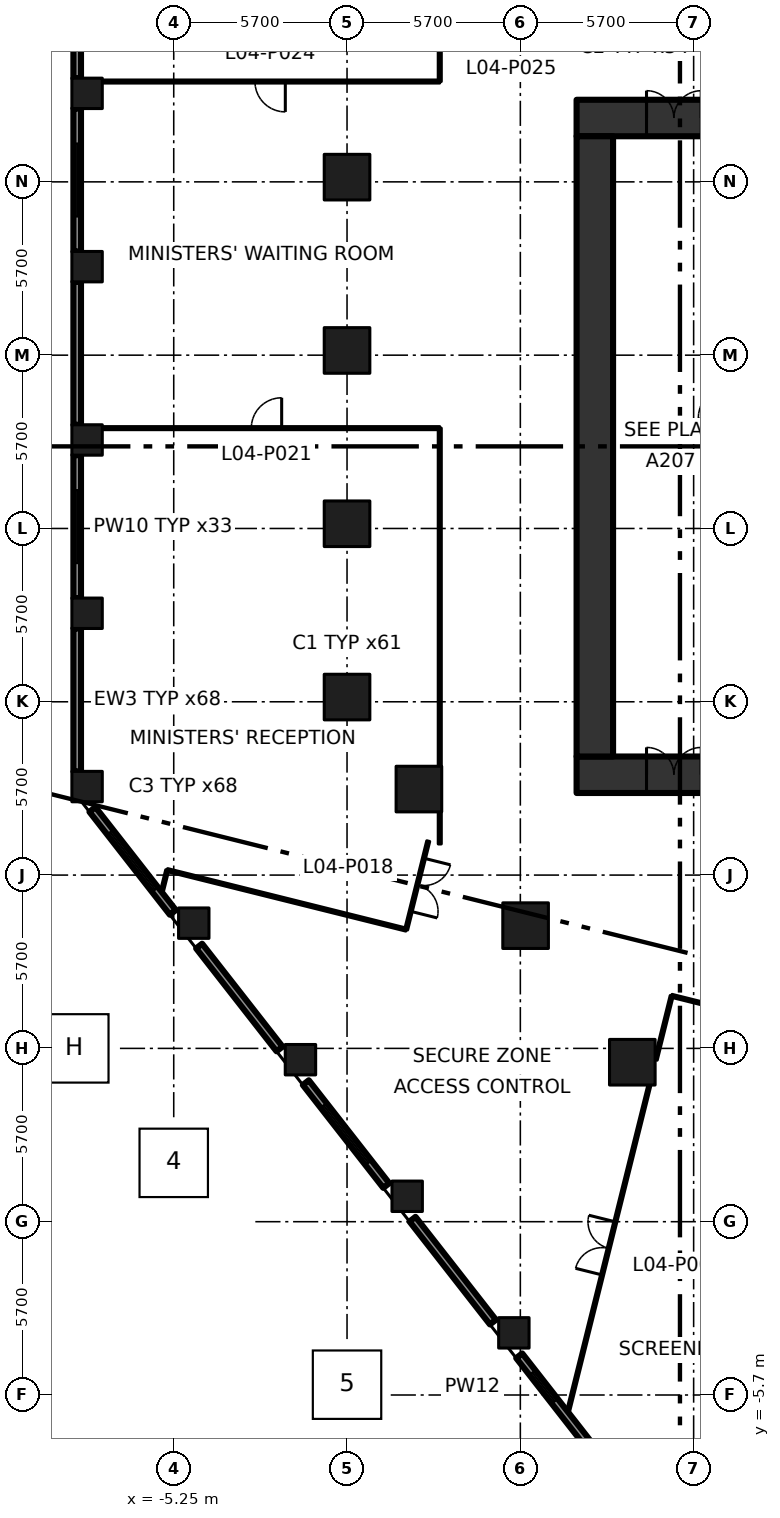
"""IFC4 building model, lengths in metres.
Left out: names, types, materials, properties, quantities, classifications, styles, units other than length and angle.
Written with IfcOpenShell. Run it as: python <this file> out.ifc"""

import sys

from ifc_helpers import new_model, si_unit, direction, frame, frame_2d, origin, origin_2d, place, context, subcontext, project, spatial, rectangle, extrude, element, fill, save


model = new_model("IFC4")
c1 = context("Model", 3, precision=1e-05, world=origin(), true_north=direction((0.0, 1.0)))
c2 = subcontext(c1, "Body", "Model", "MODEL_VIEW")
j1 = project(units=[si_unit("LENGTHUNIT", "METRE"), si_unit("PLANEANGLEUNIT", "RADIAN")], contexts=[c1])
p1 = place(None, origin())
s1 = spatial("IfcSite", under=j1, at=p1, CompositionType="ELEMENT")
p2 = place(p1, origin())
s2 = spatial("IfcBuilding", under=s1, at=p2, CompositionType="ELEMENT")
p3 = place(p2, frame((0.0, 0.0, 23.4)))
s3 = spatial("IfcBuildingStorey", under=s2, at=p3, CompositionType="ELEMENT", Elevation=23.4)
for number, where, z_axis, x_axis in (
    (1, (0.45, 17.255, 0.0), (0.0, 0.0, 1.0), (1.0, 0.0, 0.0)),
    (2, (0.45, 22.955, 0.0), (0.0, 0.0, 1.0), (1.0, 0.0, 0.0)),
    (3, (0.45, 28.655, 0.0), (0.0, 0.0, 1.0), (1.0, 0.0, 0.0)),
    (4, (0.45, 34.355, 0.0), (0.0, 0.0, 1.0), (1.0, 0.0, 0.0)),
    (5, (9.833, 5.245, 0.0), (0.0, 0.0, 1.0), (1.0, 0.0, 0.0)),
    (6, (6.323, 9.737, 0.0), (0.0, 0.0, 1.0), (1.0, 0.0, 0.0)),
    (7, (2.814, 14.229, 0.0), (0.0, 0.0, 1.0), (1.0, 0.0, 0.0)),
):
    element("IfcColumn", number, at=place(p3, frame(where, z_axis=z_axis, x_axis=x_axis)), inside=s3, PredefinedType="COLUMN", context=c2, shape_type="SweptSolid", body=[
        extrude(rectangle(XDim=1.5, YDim=1.5, at=origin_2d()), origin(), (0.0, 0.0, 1.0), 4.8),
    ])
for number, where, z_axis, x_axis in (
    (8, (-8.1, 14.311, 0.0), (0.0, 0.0, 1.0), (1.0, 0.0, 0.0)),
    (9, (-8.1, 20.011, 0.0), (0.0, 0.0, 1.0), (1.0, 0.0, 0.0)),
    (10, (-8.1, 25.711, 0.0), (0.0, 0.0, 1.0), (1.0, 0.0, 0.0)),
    (11, (-8.1, 31.411, 0.0), (0.0, 0.0, 1.0), (1.0, 0.0, 0.0)),
    (12, (-8.1, 37.111, 0.0), (0.0, 0.0, 1.0), (1.0, 0.0, 0.0)),
    (13, (-4.591, 9.819, 0.0), (0.0, 0.0, 1.0), (1.0, 0.0, 0.0)),
    (14, (-1.082, 5.328, 0.0), (0.0, 0.0, 1.0), (1.0, 0.0, 0.0)),
    (15, (2.428, 0.836, 0.0), (0.0, 0.0, 1.0), (1.0, 0.0, 0.0)),
    (16, (5.937, -3.656, 0.0), (0.0, 0.0, 1.0), (1.0, 0.0, 0.0)),
):
    element("IfcColumn", number, at=place(p3, frame(where, z_axis=z_axis, x_axis=x_axis)), inside=s3, PredefinedType="COLUMN", context=c2, shape_type="SweptSolid", body=[
        extrude(rectangle(XDim=1.0, YDim=1.0, at=origin_2d()), origin(), (0.0, 0.0, 1.0), 4.8),
    ])
p4 = place(p3, frame((8.0, 14.7, -0.45), z_axis=(0.0, 0.0, 1.0), x_axis=(1.0, 0.0, 0.0)))
e17 = element("IfcWall", 17, at=p4, inside=s3, PredefinedType="SHEAR", context=c2, shape_type="SweptSolid", body=[
    extrude(rectangle(XDim=22.8, YDim=1.2, at=frame_2d((11.4, 0.0))), origin(), (0.0, 0.0, 1.0), 4.8),
])
p5 = place(p4, frame((2.3, 0.0, 0.45)))
e18 = element("IfcOpeningElement", 18, at=p5, cuts=e17, PredefinedType="OPENING", context=c2, shape_type="SweptSolid", body=[
    extrude(rectangle(XDim=1.8, YDim=2.1, at=frame_2d((0.9, 1.05))), frame((0.0, 0.61, 0.0), z_axis=(0.0, -1.0, 0.0), x_axis=(1.0, 0.0, 0.0)), (0.0, 0.0, 1.0), 1.22),
])
p6 = place(p3, frame((8.0, 36.3, -0.45), z_axis=(0.0, 0.0, 1.0), x_axis=(1.0, 0.0, 0.0)))
e19 = element("IfcWall", 19, at=p6, inside=s3, PredefinedType="SHEAR", context=c2, shape_type="SweptSolid", body=[
    extrude(rectangle(XDim=22.8, YDim=1.2, at=frame_2d((11.4, 0.0))), origin(), (0.0, 0.0, 1.0), 4.8),
])
p7 = place(p6, frame((2.3, 0.0, 0.45)))
e20 = element("IfcOpeningElement", 20, at=p7, cuts=e19, PredefinedType="OPENING", context=c2, shape_type="SweptSolid", body=[
    extrude(rectangle(XDim=1.8, YDim=2.1, at=frame_2d((0.9, 1.05))), frame((0.0, 0.61, 0.0), z_axis=(0.0, -1.0, 0.0), x_axis=(1.0, 0.0, 0.0)), (0.0, 0.0, 1.0), 1.22),
])
p8 = place(p3, frame((8.6, 15.3, -0.45), z_axis=(0.0, 0.0, 1.0), x_axis=(0.0, 1.0, 0.0)))
e21 = element("IfcWall", 21, at=p8, inside=s3, PredefinedType="SHEAR", context=c2, shape_type="SweptSolid", body=[
    extrude(rectangle(XDim=20.4, YDim=1.2, at=frame_2d((10.2, 0.0))), origin(), (0.0, 0.0, 1.0), 4.8),
])
p9 = place(p3, frame((-7.58, 26.1, 0.0), z_axis=(0.0, 0.0, 1.0), x_axis=(1.0, 0.0, 0.0)))
e22 = element("IfcWall", 22, at=p9, inside=s3, PredefinedType="PARTITIONING", context=c2, shape_type="SweptSolid", body=[
    extrude(rectangle(XDim=11.08, YDim=0.1, at=frame_2d((5.54, 0.0))), origin(), (0.0, 0.0, 1.0), 4.35),
])
p10 = place(p9, frame((4.88, 0.0, 0.0)))
e23 = element("IfcOpeningElement", 23, at=p10, cuts=e22, PredefinedType="OPENING", context=c2, shape_type="SweptSolid", body=[
    extrude(rectangle(XDim=1.0, YDim=2.1, at=frame_2d((0.5, 1.05))), frame((0.0, 0.06, 0.0), z_axis=(0.0, -1.0, 0.0), x_axis=(1.0, 0.0, 0.0)), (0.0, 0.0, 1.0), 0.12),
])
p11 = place(p3, frame((-5.464, 11.565, 0.0), z_axis=(0.0, 0.0, 1.0), x_axis=(-0.24207252228, -0.970258158408, 0.0)))
e24 = element("IfcWall", 24, at=p11, inside=s3, PredefinedType="PARTITIONING", context=c2, shape_type="SweptSolid", body=[
    extrude(rectangle(XDim=0.744, YDim=0.1, at=frame_2d((0.372, 0.0))), origin(), (0.0, 0.0, 1.0), 4.35),
])
p12 = place(p3, frame((2.395, 9.606, 0.0), z_axis=(0.0, 0.0, 1.0), x_axis=(-0.97031070843, 0.241861797535, 0.0)))
e25 = element("IfcWall", 25, at=p12, inside=s3, PredefinedType="PARTITIONING", context=c2, shape_type="SweptSolid", body=[
    extrude(rectangle(XDim=8.1, YDim=0.1, at=frame_2d((4.05, 0.0))), origin(), (0.0, 0.0, 1.0), 4.35),
])
p13 = place(p3, frame((3.121, 12.517, 0.0), z_axis=(0.0, 0.0, 1.0), x_axis=(-0.241999491975, -0.970276376031, 0.0)))
e26 = element("IfcWall", 26, at=p13, inside=s3, PredefinedType="PARTITIONING", context=c2, shape_type="SweptSolid", body=[
    extrude(rectangle(XDim=3.0, YDim=0.1, at=frame_2d((1.5, 0.0))), origin(), (0.0, 0.0, 1.0), 4.35),
])
p14 = place(p13, frame((0.58, 0.0, 0.0)))
e27 = element("IfcOpeningElement", 27, at=p14, cuts=e26, PredefinedType="OPENING", context=c2, shape_type="SweptSolid", body=[
    extrude(rectangle(XDim=1.8, YDim=2.1, at=frame_2d((0.9, 1.05))), frame((0.0, 0.06, 0.0), z_axis=(0.0, -1.0, 0.0), x_axis=(1.0, 0.0, 0.0)), (0.0, 0.0, 1.0), 0.12),
])
p15 = place(p3, frame((3.5, 13.459, 0.0), z_axis=(0.0, 0.0, 1.0), x_axis=(0.0, -1.0, 0.0)))
e28 = element("IfcWall", 28, at=p15, inside=s3, PredefinedType="PARTITIONING", context=c2, shape_type="SweptSolid", body=[
    extrude(rectangle(XDim=1.036, YDim=0.1, at=frame_2d((0.518, 0.0))), origin(), (0.0, 0.0, 1.0), 4.35),
])
p16 = place(p3, frame((3.5, 26.1, 0.0), z_axis=(0.0, 0.0, 1.0), x_axis=(0.0, -1.0, 0.0)))
e29 = element("IfcWall", 29, at=p16, inside=s3, PredefinedType="PARTITIONING", context=c2, shape_type="SweptSolid", body=[
    extrude(rectangle(XDim=11.101, YDim=0.1, at=frame_2d((5.551, 0.0))), origin(), (0.0, 0.0, 1.0), 4.35),
])
p17 = place(p3, frame((3.5, 37.5, 0.0), z_axis=(0.0, 0.0, 1.0), x_axis=(-1.0, 0.0, 0.0)))
e30 = element("IfcWall", 30, at=p17, inside=s3, PredefinedType="PARTITIONING", context=c2, shape_type="SweptSolid", body=[
    extrude(rectangle(XDim=11.08, YDim=0.1, at=frame_2d((5.54, 0.0))), origin(), (0.0, 0.0, 1.0), 4.35),
])
p18 = place(p17, frame((5.08, 0.0, 0.0)))
e31 = element("IfcOpeningElement", 31, at=p18, cuts=e30, PredefinedType="OPENING", context=c2, shape_type="SweptSolid", body=[
    extrude(rectangle(XDim=1.0, YDim=2.1, at=frame_2d((0.5, 1.05))), frame((0.0, 0.06, 0.0), z_axis=(0.0, -1.0, 0.0), x_axis=(1.0, 0.0, 0.0)), (0.0, 0.0, 1.0), 0.12),
])
p19 = place(p3, frame((3.5, 41.4, 0.0), z_axis=(0.0, 0.0, 1.0), x_axis=(0.0, -1.0, 0.0)))
e32 = element("IfcWall", 32, at=p19, inside=s3, PredefinedType="PARTITIONING", context=c2, shape_type="SweptSolid", body=[
    extrude(rectangle(XDim=3.9, YDim=0.1, at=frame_2d((1.95, 0.0))), origin(), (0.0, 0.0, 1.0), 4.35),
])
p20 = place(p19, frame((0.98, 0.0, 0.0)))
e33 = element("IfcOpeningElement", 33, at=p20, cuts=e32, PredefinedType="OPENING", context=c2, shape_type="SweptSolid", body=[
    extrude(rectangle(XDim=1.8, YDim=2.1, at=frame_2d((0.9, 1.05))), frame((0.0, 0.06, 0.0), z_axis=(0.0, -1.0, 0.0), x_axis=(1.0, 0.0, 0.0)), (0.0, 0.0, 1.0), 0.12),
])
p21 = place(p3, frame((7.716, -6.257, 0.0), z_axis=(0.0, 0.0, 1.0), x_axis=(0.241891576484, 0.970303285177, 0.0)))
e34 = element("IfcWall", 34, at=p21, inside=s3, PredefinedType="PARTITIONING", context=c2, shape_type="SweptSolid", body=[
    extrude(rectangle(XDim=11.061, YDim=0.1, at=frame_2d((5.53, 0.0))), origin(), (0.0, 0.0, 1.0), 4.35),
])
p22 = place(p21, frame((4.644, 0.0, 0.0)))
e35 = element("IfcOpeningElement", 35, at=p22, cuts=e34, PredefinedType="OPENING", context=c2, shape_type="SweptSolid", body=[
    extrude(rectangle(XDim=1.8, YDim=2.1, at=frame_2d((0.9, 1.05))), frame((0.0, 0.06, 0.0), z_axis=(0.0, -1.0, 0.0), x_axis=(1.0, 0.0, 0.0)), (0.0, 0.0, 1.0), 0.12),
])
p23 = place(p3, frame((10.603, 5.323, 0.0), z_axis=(0.0, 0.0, 1.0), x_axis=(0.241847407238, 0.970314295273, 0.0)))
e36 = element("IfcWall", 36, at=p23, inside=s3, PredefinedType="PARTITIONING", context=c2, shape_type="SweptSolid", body=[
    extrude(rectangle(XDim=2.17, YDim=0.1, at=frame_2d((1.085, 0.0))), origin(), (0.0, 0.0, 1.0), 4.35),
])
p24 = place(p3, frame((11.128, 7.429, 0.0), z_axis=(0.0, 0.0, 1.0), x_axis=(0.970281210621, -0.241980107272, 0.0)))
e37 = element("IfcWall", 37, at=p24, inside=s3, PredefinedType="PARTITIONING", context=c2, shape_type="SweptSolid", body=[
    extrude(rectangle(XDim=7.86, YDim=0.1, at=frame_2d((3.93, 0.0))), origin(), (0.0, 0.0, 1.0), 4.35),
])
p25 = place(p24, frame((3.38, 0.0, 0.0)))
e38 = element("IfcOpeningElement", 38, at=p25, cuts=e37, PredefinedType="OPENING", context=c2, shape_type="SweptSolid", body=[
    extrude(rectangle(XDim=1.0, YDim=2.1, at=frame_2d((0.5, 1.05))), frame((0.0, 0.06, 0.0), z_axis=(0.0, -1.0, 0.0), x_axis=(1.0, 0.0, 0.0)), (0.0, 0.0, 1.0), 0.12),
])
p26 = place(p3, frame((-8.425, 42.311, 0.0), z_axis=(0.0, 0.0, 1.0), x_axis=(0.0, -1.0, 0.0)))
e39 = element("IfcWall", 39, at=p26, inside=s3, PredefinedType="SOLIDWALL", context=c2, shape_type="SweptSolid", body=[
    extrude(rectangle(XDim=4.7, YDim=0.25, at=frame_2d((2.35, 0.0))), origin(), (0.0, 0.0, 1.0), 3.45),
])
p27 = place(p3, frame((-8.425, 36.611, 0.0), z_axis=(0.0, 0.0, 1.0), x_axis=(0.0, -1.0, 0.0)))
e40 = element("IfcWall", 40, at=p27, inside=s3, PredefinedType="SOLIDWALL", context=c2, shape_type="SweptSolid", body=[
    extrude(rectangle(XDim=4.7, YDim=0.25, at=frame_2d((2.35, 0.0))), origin(), (0.0, 0.0, 1.0), 3.45),
])
p28 = place(p27, frame((1.15, 0.0, 0.9)))
e41 = element("IfcOpeningElement", 41, at=p28, cuts=e40, PredefinedType="OPENING", context=c2, shape_type="SweptSolid", body=[
    extrude(rectangle(XDim=2.4, YDim=2.1, at=frame_2d((1.2, 1.05))), frame((0.0, 0.135, 0.0), z_axis=(0.0, -1.0, 0.0), x_axis=(1.0, 0.0, 0.0)), (0.0, 0.0, 1.0), 0.27),
])
p29 = place(p3, frame((-8.425, 30.911, 0.0), z_axis=(0.0, 0.0, 1.0), x_axis=(0.0, -1.0, 0.0)))
e42 = element("IfcWall", 42, at=p29, inside=s3, PredefinedType="SOLIDWALL", context=c2, shape_type="SweptSolid", body=[
    extrude(rectangle(XDim=4.7, YDim=0.25, at=frame_2d((2.35, 0.0))), origin(), (0.0, 0.0, 1.0), 3.45),
])
p30 = place(p3, frame((-8.425, 25.211, 0.0), z_axis=(0.0, 0.0, 1.0), x_axis=(0.0, -1.0, 0.0)))
e43 = element("IfcWall", 43, at=p30, inside=s3, PredefinedType="SOLIDWALL", context=c2, shape_type="SweptSolid", body=[
    extrude(rectangle(XDim=4.7, YDim=0.25, at=frame_2d((2.35, 0.0))), origin(), (0.0, 0.0, 1.0), 3.45),
])
p31 = place(p30, frame((1.15, 0.0, 0.9)))
e44 = element("IfcOpeningElement", 44, at=p31, cuts=e43, PredefinedType="OPENING", context=c2, shape_type="SweptSolid", body=[
    extrude(rectangle(XDim=2.4, YDim=2.1, at=frame_2d((1.2, 1.05))), frame((0.0, 0.135, 0.0), z_axis=(0.0, -1.0, 0.0), x_axis=(1.0, 0.0, 0.0)), (0.0, 0.0, 1.0), 0.27),
])
p32 = place(p3, frame((-8.425, 19.511, 0.0), z_axis=(0.0, 0.0, 1.0), x_axis=(0.0, -1.0, 0.0)))
e45 = element("IfcWall", 45, at=p32, inside=s3, PredefinedType="SOLIDWALL", context=c2, shape_type="SweptSolid", body=[
    extrude(rectangle(XDim=4.7, YDim=0.25, at=frame_2d((2.35, 0.0))), origin(), (0.0, 0.0, 1.0), 3.45),
])
p33 = place(p3, frame((-7.924, 13.558, 0.0), z_axis=(0.0, 0.0, 1.0), x_axis=(0.615603242749, -0.788056246417, 0.0)))
e46 = element("IfcWall", 46, at=p33, inside=s3, PredefinedType="SOLIDWALL", context=c2, shape_type="SweptSolid", body=[
    extrude(rectangle(XDim=4.297, YDim=0.25, at=frame_2d((2.148, 0.0))), origin(), (0.0, 0.0, 1.0), 3.45),
])
p34 = place(p33, frame((0.948, 0.0, 0.9)))
e47 = element("IfcOpeningElement", 47, at=p34, cuts=e46, PredefinedType="OPENING", context=c2, shape_type="SweptSolid", body=[
    extrude(rectangle(XDim=2.4, YDim=2.1, at=frame_2d((1.2, 1.05))), frame((0.0, 0.135, 0.0), z_axis=(0.0, -1.0, 0.0), x_axis=(1.0, 0.0, 0.0)), (0.0, 0.0, 1.0), 0.27),
])
p35 = place(p3, frame((-4.415, 9.066, 0.0), z_axis=(0.0, 0.0, 1.0), x_axis=(0.615713519567, -0.787970089421, 0.0)))
e48 = element("IfcWall", 48, at=p35, inside=s3, PredefinedType="SOLIDWALL", context=c2, shape_type="SweptSolid", body=[
    extrude(rectangle(XDim=4.296, YDim=0.25, at=frame_2d((2.148, 0.0))), origin(), (0.0, 0.0, 1.0), 3.45),
])
p36 = place(p3, frame((-0.906, 4.575, 0.0), z_axis=(0.0, 0.0, 1.0), x_axis=(0.61574436495, -0.787945986113, 0.0)))
e49 = element("IfcWall", 49, at=p36, inside=s3, PredefinedType="SOLIDWALL", context=c2, shape_type="SweptSolid", body=[
    extrude(rectangle(XDim=4.297, YDim=0.25, at=frame_2d((2.148, 0.0))), origin(), (0.0, 0.0, 1.0), 3.45),
])
p37 = place(p36, frame((0.949, 0.0, 0.9)))
e50 = element("IfcOpeningElement", 50, at=p37, cuts=e49, PredefinedType="OPENING", context=c2, shape_type="SweptSolid", body=[
    extrude(rectangle(XDim=2.4, YDim=2.1, at=frame_2d((1.2, 1.05))), frame((0.0, 0.135, 0.0), z_axis=(0.0, -1.0, 0.0), x_axis=(1.0, 0.0, 0.0)), (0.0, 0.0, 1.0), 0.27),
])
p38 = place(p3, frame((2.604, 0.083, 0.0), z_axis=(0.0, 0.0, 1.0), x_axis=(0.615603242749, -0.788056246417, 0.0)))
e51 = element("IfcWall", 51, at=p38, inside=s3, PredefinedType="SOLIDWALL", context=c2, shape_type="SweptSolid", body=[
    extrude(rectangle(XDim=4.297, YDim=0.25, at=frame_2d((2.148, 0.0))), origin(), (0.0, 0.0, 1.0), 3.45),
])
p39 = place(p3, frame((6.113, -4.409, 0.0), z_axis=(0.0, 0.0, 1.0), x_axis=(0.615603242749, -0.788056246417, 0.0)))
e52 = element("IfcWall", 52, at=p39, inside=s3, PredefinedType="SOLIDWALL", context=c2, shape_type="SweptSolid", body=[
    extrude(rectangle(XDim=4.297, YDim=0.25, at=frame_2d((2.148, 0.0))), origin(), (0.0, 0.0, 1.0), 3.45),
])
p40 = place(p39, frame((0.702, 0.0, 0.9)))
e53 = element("IfcOpeningElement", 53, at=p40, cuts=e52, PredefinedType="OPENING", context=c2, shape_type="SweptSolid", body=[
    extrude(rectangle(XDim=1.2, YDim=2.1, at=frame_2d((0.6, 1.05))), frame((0.0, 0.135, 0.0), z_axis=(0.0, -1.0, 0.0), x_axis=(1.0, 0.0, 0.0)), (0.0, 0.0, 1.0), 0.27),
])
p41 = place(p7, origin())
e54 = element("IfcDoor", 54, at=p41, inside=s3, OperationType="DOUBLE_DOOR_SINGLE_SWING", PredefinedType="DOOR", context=c2, shape_type="SweptSolid", body=[
    extrude(rectangle(XDim=1.8, YDim=2.1, at=frame_2d((0.9, 1.05))), frame((0.0, 0.025, 0.0), z_axis=(0.0, -1.0, 0.0), x_axis=(1.0, 0.0, 0.0)), (0.0, 0.0, 1.0), 0.05),
])
fill(e20, e54)
p42 = place(p5, origin())
e55 = element("IfcDoor", 55, at=p42, inside=s3, OperationType="DOUBLE_DOOR_SINGLE_SWING", PredefinedType="DOOR", context=c2, shape_type="SweptSolid", body=[
    extrude(rectangle(XDim=1.8, YDim=2.1, at=frame_2d((0.9, 1.05))), frame((0.0, 0.025, 0.0), z_axis=(0.0, -1.0, 0.0), x_axis=(1.0, 0.0, 0.0)), (0.0, 0.0, 1.0), 0.05),
])
fill(e18, e55)
p43 = place(p22, origin())
e56 = element("IfcDoor", 56, at=p43, inside=s3, OperationType="DOUBLE_DOOR_SINGLE_SWING", PredefinedType="DOOR", context=c2, shape_type="SweptSolid", body=[
    extrude(rectangle(XDim=1.8, YDim=2.1, at=frame_2d((0.9, 1.05))), frame((0.0, 0.025, 0.0), z_axis=(0.0, -1.0, 0.0), x_axis=(1.0, 0.0, 0.0)), (0.0, 0.0, 1.0), 0.05),
])
fill(e35, e56)
p44 = place(p14, origin())
e57 = element("IfcDoor", 57, at=p44, inside=s3, OperationType="DOUBLE_DOOR_SINGLE_SWING", PredefinedType="DOOR", context=c2, shape_type="SweptSolid", body=[
    extrude(rectangle(XDim=1.8, YDim=2.1, at=frame_2d((0.9, 1.05))), frame((0.0, 0.025, 0.0), z_axis=(0.0, -1.0, 0.0), x_axis=(1.0, 0.0, 0.0)), (0.0, 0.0, 1.0), 0.05),
])
fill(e27, e57)
p45 = place(p10, origin())
e58 = element("IfcDoor", 58, at=p45, inside=s3, OperationType="SINGLE_SWING_RIGHT", PredefinedType="DOOR", context=c2, shape_type="SweptSolid", body=[
    extrude(rectangle(XDim=1.0, YDim=2.1, at=frame_2d((0.5, 1.05))), frame((0.0, 0.025, 0.0), z_axis=(0.0, -1.0, 0.0), x_axis=(1.0, 0.0, 0.0)), (0.0, 0.0, 1.0), 0.05),
])
fill(e23, e58)
p46 = place(p18, origin())
e59 = element("IfcDoor", 59, at=p46, inside=s3, OperationType="SINGLE_SWING_LEFT", PredefinedType="DOOR", context=c2, shape_type="SweptSolid", body=[
    extrude(rectangle(XDim=1.0, YDim=2.1, at=frame_2d((0.5, 1.05))), frame((0.0, 0.025, 0.0), z_axis=(0.0, -1.0, 0.0), x_axis=(1.0, 0.0, 0.0)), (0.0, 0.0, 1.0), 0.05),
])
fill(e31, e59)
p47 = place(p28, origin())
e60 = element("IfcWindow", 60, at=p47, inside=s3, PartitioningType="DOUBLE_PANEL_VERTICAL", PredefinedType="WINDOW", context=c2, shape_type="SweptSolid", body=[
    extrude(rectangle(XDim=2.4, YDim=2.1, at=frame_2d((1.2, 1.05))), frame((0.0, 0.03, 0.0), z_axis=(0.0, -1.0, 0.0), x_axis=(1.0, 0.0, 0.0)), (0.0, 0.0, 1.0), 0.06),
])
fill(e41, e60)
p48 = place(p31, origin())
e61 = element("IfcWindow", 61, at=p48, inside=s3, PartitioningType="DOUBLE_PANEL_VERTICAL", PredefinedType="WINDOW", context=c2, shape_type="SweptSolid", body=[
    extrude(rectangle(XDim=2.4, YDim=2.1, at=frame_2d((1.2, 1.05))), frame((0.0, 0.03, 0.0), z_axis=(0.0, -1.0, 0.0), x_axis=(1.0, 0.0, 0.0)), (0.0, 0.0, 1.0), 0.06),
])
fill(e44, e61)
p49 = place(p34, origin())
e62 = element("IfcWindow", 62, at=p49, inside=s3, PartitioningType="DOUBLE_PANEL_VERTICAL", PredefinedType="WINDOW", context=c2, shape_type="SweptSolid", body=[
    extrude(rectangle(XDim=2.4, YDim=2.1, at=frame_2d((1.2, 1.05))), frame((0.0, 0.03, 0.0), z_axis=(0.0, -1.0, 0.0), x_axis=(1.0, 0.0, 0.0)), (0.0, 0.0, 1.0), 0.06),
])
fill(e47, e62)
p50 = place(p37, origin())
e63 = element("IfcWindow", 63, at=p50, inside=s3, PartitioningType="DOUBLE_PANEL_VERTICAL", PredefinedType="WINDOW", context=c2, shape_type="SweptSolid", body=[
    extrude(rectangle(XDim=2.4, YDim=2.1, at=frame_2d((1.2, 1.05))), frame((0.0, 0.03, 0.0), z_axis=(0.0, -1.0, 0.0), x_axis=(1.0, 0.0, 0.0)), (0.0, 0.0, 1.0), 0.06),
])
fill(e50, e63)
p51 = place(p40, origin())
e64 = element("IfcWindow", 64, at=p51, inside=s3, PartitioningType="SINGLE_PANEL", PredefinedType="WINDOW", context=c2, shape_type="SweptSolid", body=[
    extrude(rectangle(XDim=1.2, YDim=2.1, at=frame_2d((0.6, 1.05))), frame((0.0, 0.03, 0.0), z_axis=(0.0, -1.0, 0.0), x_axis=(1.0, 0.0, 0.0)), (0.0, 0.0, 1.0), 0.06),
])
fill(e53, e64)
save(model, sys.argv[1])
